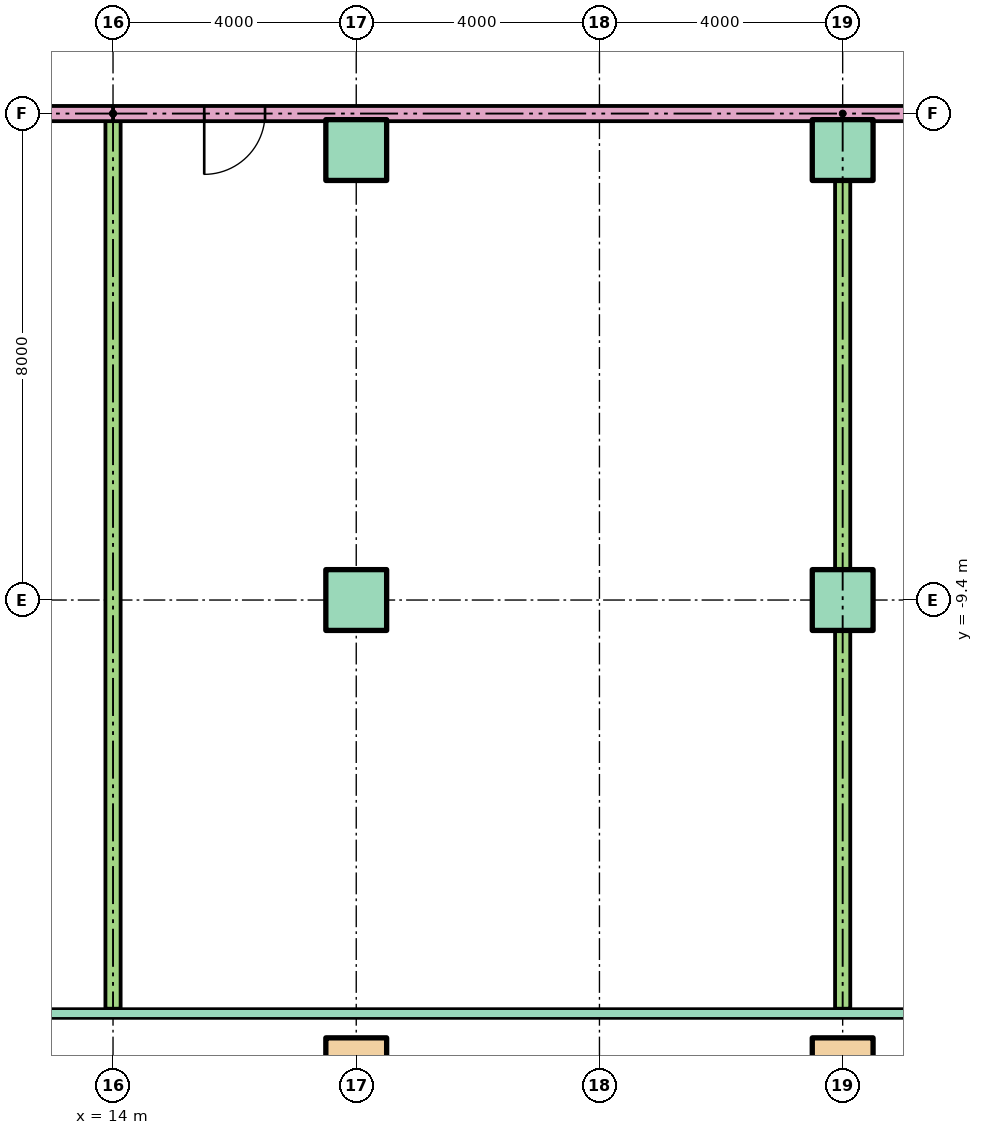
"""IFC4 building model, lengths in metres.
Left out: names, types, materials, properties, quantities, classifications, styles, units other than length and angle.
Written with IfcOpenShell. Run it as: python <this file> out.ifc"""

import sys

from ifc_helpers import new_model, si_unit, direction, frame, frame_2d, origin, origin_2d, place, context, subcontext, project, spatial, rectangle, hollow_rectangle, extrude, element, fill, save


model = new_model("IFC4")
c1 = context("Model", 3, precision=1e-05, world=origin(), true_north=direction((0.0, 1.0)))
c2 = subcontext(c1, "Body", "Model", "MODEL_VIEW")
j1 = project(units=[si_unit("LENGTHUNIT", "METRE"), si_unit("PLANEANGLEUNIT", "RADIAN")], contexts=[c1])
p1 = place(None, origin())
s1 = spatial("IfcSite", under=j1, at=p1, CompositionType="ELEMENT")
p2 = place(p1, origin())
s2 = spatial("IfcBuilding", under=s1, at=p2, CompositionType="ELEMENT")
p3 = place(p2, frame((0.0, 0.0, 33.8)))
s3 = spatial("IfcBuildingStorey", under=s2, at=p3, CompositionType="ELEMENT", Elevation=33.8)
for number, where in (
    (1, (18.0, -17.1, 0.0)),
    (2, (26.0, -17.1, 0.0)),
):
    element("IfcColumn", number, at=place(p3, frame(where)), inside=s3, PredefinedType="COLUMN", context=c2, shape_type="SweptSolid", body=[
        extrude(hollow_rectangle(XDim=1.0, YDim=1.0, WallThickness=0.05, at=origin_2d()), origin(), (0.0, 0.0, 1.0), 3.9),
    ])
for number, where in (
    (3, (18.0, -9.4, 0.0)),
    (4, (26.0, -9.4, 0.0)),
    (5, (18.0, -2.0, 0.0)),
    (6, (26.0, -2.0, 0.0)),
):
    element("IfcColumn", number, at=place(p3, frame(where)), inside=s3, PredefinedType="COLUMN", context=c2, shape_type="SweptSolid", body=[
        extrude(rectangle(XDim=1.0, YDim=1.0, at=origin_2d()), origin(), (0.0, 0.0, 1.0), 3.9),
    ])
p4 = place(p3, frame((29.0, -1.4, 0.0), z_axis=(0.0, 0.0, 1.0), x_axis=(-1.0, 0.0, 0.0)))
e7 = element("IfcWall", 7, at=p4, inside=s3, PredefinedType="PARTITIONING", context=c2, shape_type="SweptSolid", body=[
    extrude(rectangle(XDim=15.0, YDim=0.25, at=frame_2d((7.5, 0.0))), origin(), (0.0, 0.0, 1.0), 3.1),
])
p5 = place(p4, frame((12.5, 0.0, 0.0)))
e8 = element("IfcOpeningElement", 8, at=p5, cuts=e7, PredefinedType="OPENING", context=c2, shape_type="SweptSolid", body=[
    extrude(rectangle(XDim=1.0, YDim=2.1, at=frame_2d((0.5, 1.05))), frame((0.0, 0.135, 0.0), z_axis=(0.0, -1.0, 0.0), x_axis=(1.0, 0.0, 0.0)), (0.0, 0.0, 1.0), 0.27),
])
p6 = place(p4, frame((0.5, 0.0, 0.0)))
e9 = element("IfcOpeningElement", 9, at=p6, cuts=e7, PredefinedType="OPENING", context=c2, shape_type="SweptSolid", body=[
    extrude(rectangle(XDim=1.0, YDim=2.1, at=frame_2d((0.5, 1.05))), frame((0.0, 0.135, 0.0), z_axis=(0.0, -1.0, 0.0), x_axis=(1.0, 0.0, 0.0)), (0.0, 0.0, 1.0), 0.27),
])
for number, where, z_axis, x_axis in (
    (10, (14.0, -1.4, 0.0), (0.0, 0.0, 1.0), (0.0, -1.0, 0.0)),
    (11, (26.0, -1.4, 0.0), (0.0, 0.0, 1.0), (0.0, -1.0, 0.0)),
):
    element("IfcWall", number, at=place(p3, frame(where, z_axis=z_axis, x_axis=x_axis)), inside=s3, PredefinedType="PARTITIONING", context=c2, shape_type="SweptSolid", body=[
        extrude(rectangle(XDim=14.721, YDim=0.25, at=frame_2d((7.361, 0.0))), origin(), (0.0, 0.0, 1.0), 3.1),
    ])
p7 = place(p3, frame((14.0, -1.4, 0.0), z_axis=(0.0, 0.0, 1.0), x_axis=(-1.0, 0.0, 0.0)))
e12 = element("IfcWall", 12, at=p7, inside=s3, PredefinedType="PARTITIONING", context=c2, shape_type="SweptSolid", body=[
    extrude(rectangle(XDim=28.0, YDim=0.25, at=frame_2d((14.0, 0.0))), origin(), (0.0, 0.0, 1.0), 3.1),
])
p8 = place(p7, frame((17.5, 0.0, 0.0)))
e13 = element("IfcOpeningElement", 13, at=p8, cuts=e12, PredefinedType="OPENING", context=c2, shape_type="SweptSolid", body=[
    extrude(rectangle(XDim=1.0, YDim=2.1, at=frame_2d((0.5, 1.05))), frame((0.0, 0.135, 0.0), z_axis=(0.0, -1.0, 0.0), x_axis=(1.0, 0.0, 0.0)), (0.0, 0.0, 1.0), 0.27),
])
p9 = place(p7, frame((13.5, 0.0, 0.0)))
e14 = element("IfcOpeningElement", 14, at=p9, cuts=e12, PredefinedType="OPENING", context=c2, shape_type="SweptSolid", body=[
    extrude(rectangle(XDim=1.0, YDim=2.1, at=frame_2d((0.5, 1.05))), frame((0.0, 0.135, 0.0), z_axis=(0.0, -1.0, 0.0), x_axis=(1.0, 0.0, 0.0)), (0.0, 0.0, 1.0), 0.27),
])
p10 = place(p5, origin())
e15 = element("IfcDoor", 15, at=p10, inside=s3, OperationType="SINGLE_SWING_RIGHT", PredefinedType="DOOR", context=c2, shape_type="SweptSolid", body=[
    extrude(rectangle(XDim=1.0, YDim=2.1, at=frame_2d((0.5, 1.05))), frame((0.0, 0.025, 0.0), z_axis=(0.0, -1.0, 0.0), x_axis=(1.0, 0.0, 0.0)), (0.0, 0.0, 1.0), 0.05),
])
fill(e8, e15)
save(model, sys.argv[1])
